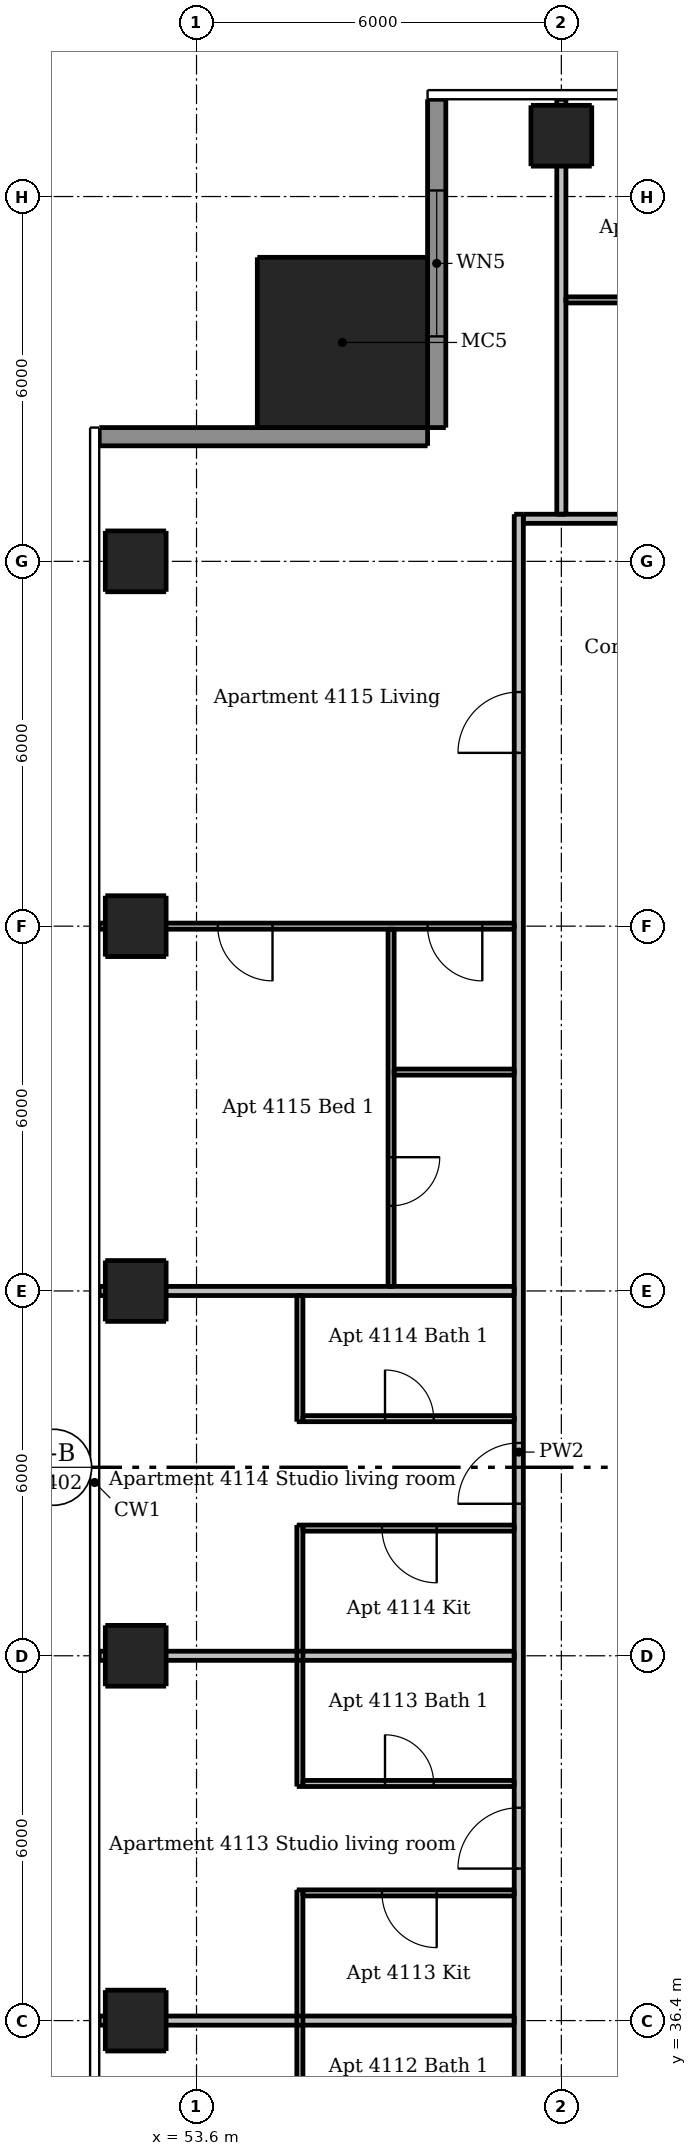
"""IFC4 building model, lengths in metres.
Left out: names, types, materials, properties, quantities, classifications, styles, units other than length and angle.
Written with IfcOpenShell. Run it as: python <this file> out.ifc"""

import sys

from ifc_helpers import new_model, si_unit, direction, frame, frame_2d, origin, origin_2d, place, context, subcontext, project, spatial, rectangle, extrude, element, fill, save


model = new_model("IFC4")
c1 = context("Model", 3, precision=1e-05, world=origin(), true_north=direction((0.0, 1.0)))
c2 = subcontext(c1, "Body", "Model", "MODEL_VIEW")
j1 = project(units=[si_unit("LENGTHUNIT", "METRE"), si_unit("PLANEANGLEUNIT", "RADIAN")], contexts=[c1])
p1 = place(None, origin())
s1 = spatial("IfcSite", under=j1, at=p1, CompositionType="ELEMENT")
p2 = place(p1, origin())
s2 = spatial("IfcBuilding", under=s1, at=p2, CompositionType="ELEMENT")
p3 = place(p2, frame((0.0, 0.0, 154.9)))
s3 = spatial("IfcBuildingStorey", under=s2, at=p3, CompositionType="ELEMENT", Elevation=154.9)
for number, where, z_axis, x_axis in (
    (1, (59.6, 67.4, 0.0), (0.0, 0.0, 1.0), (1.0, 0.0, 0.0)),
    (2, (52.6, 36.4, 0.0), (0.0, 0.0, 1.0), (1.0, 0.0, 0.0)),
    (3, (52.6, 42.4, 0.0), (0.0, 0.0, 1.0), (1.0, 0.0, 0.0)),
    (4, (52.6, 48.4, 0.0), (0.0, 0.0, 1.0), (1.0, 0.0, 0.0)),
    (5, (52.6, 54.4, 0.0), (0.0, 0.0, 1.0), (1.0, 0.0, 0.0)),
    (6, (52.6, 60.4, 0.0), (0.0, 0.0, 1.0), (1.0, 0.0, 0.0)),
):
    element("IfcColumn", number, at=place(p3, frame(where, z_axis=z_axis, x_axis=x_axis)), inside=s3, PredefinedType="COLUMN", context=c2, shape_type="SweptSolid", body=[
        extrude(rectangle(XDim=1.0, YDim=1.0, at=origin_2d()), origin(), (0.0, 0.0, 1.0), 3.05),
    ])
p4 = place(p3, frame((56.0, 64.0, 0.0), z_axis=(0.0, 0.0, 1.0), x_axis=(1.0, 0.0, 0.0)))
e7 = element("IfcColumn", 7, at=p4, inside=s3, PredefinedType="COLUMN", context=c2, shape_type="SweptSolid", body=[
    extrude(rectangle(XDim=2.8, YDim=2.8, at=origin_2d()), origin(), (0.0, 0.0, 1.0), 3.3),
])
p5 = place(p3, frame((57.55, 68.0, 0.0), z_axis=(0.0, 0.0, 1.0), x_axis=(0.0, -1.0, 0.0)))
e8 = element("IfcWall", 8, at=p5, inside=s3, PredefinedType="SOLIDWALL", context=c2, shape_type="SweptSolid", body=[
    extrude(rectangle(XDim=5.4, YDim=0.3, at=frame_2d((2.7, 0.0))), origin(), (0.0, 0.0, 1.0), 3.05),
])
p6 = place(p5, frame((1.5, 0.0, 0.15)))
e9 = element("IfcOpeningElement", 9, at=p6, cuts=e8, PredefinedType="OPENING", context=c2, shape_type="SweptSolid", body=[
    extrude(rectangle(XDim=2.4, YDim=2.1, at=frame_2d((1.2, 1.05))), frame((0.0, 0.16, 0.0), z_axis=(0.0, -1.0, 0.0), x_axis=(1.0, 0.0, 0.0)), (0.0, 0.0, 1.0), 0.32),
])
p7 = place(p3, frame((57.4, 62.45, 0.0), z_axis=(0.0, 0.0, 1.0), x_axis=(-1.0, 0.0, 0.0)))
e10 = element("IfcWall", 10, at=p7, inside=s3, PredefinedType="SOLIDWALL", context=c2, shape_type="SweptSolid", body=[
    extrude(rectangle(XDim=5.4, YDim=0.3, at=frame_2d((2.7, 0.0))), origin(), (0.0, 0.0, 1.0), 3.05),
])
for number, where, z_axis, x_axis in (
    (11, (55.3, 34.25, 0.0), (0.0, 0.0, 1.0), (0.0, 1.0, 0.0)),
    (12, (55.3, 40.25, 0.0), (0.0, 0.0, 1.0), (0.0, 1.0, 0.0)),
):
    element("IfcWall", number, at=place(p3, frame(where, z_axis=z_axis, x_axis=x_axis)), inside=s3, PredefinedType="PARTITIONING", context=c2, shape_type="SweptSolid", body=[
        extrude(rectangle(XDim=4.3, YDim=0.1, at=frame_2d((2.15, 0.0))), origin(), (0.0, 0.0, 1.0), 3.05),
    ])
p8 = place(p3, frame((55.3, 46.25, 0.0), z_axis=(0.0, 0.0, 1.0), x_axis=(0.0, 1.0, 0.0)))
e13 = element("IfcWall", 13, at=p8, inside=s3, PredefinedType="PARTITIONING", context=c2, shape_type="SweptSolid", body=[
    extrude(rectangle(XDim=2.075, YDim=0.1, at=frame_2d((1.038, 0.0))), origin(), (0.0, 0.0, 1.0), 3.05),
])
p9 = place(p3, frame((56.8, 54.35, 0.0), z_axis=(0.0, 0.0, 1.0), x_axis=(0.0, -1.0, 0.0)))
e14 = element("IfcWall", 14, at=p9, inside=s3, PredefinedType="PARTITIONING", context=c2, shape_type="SweptSolid", body=[
    extrude(rectangle(XDim=5.875, YDim=0.1, at=frame_2d((2.938, 0.0))), origin(), (0.0, 0.0, 1.0), 3.05),
])
p10 = place(p9, frame((3.75, 0.0, 0.0)))
e15 = element("IfcOpeningElement", 15, at=p10, cuts=e14, PredefinedType="OPENING", context=c2, shape_type="SweptSolid", body=[
    extrude(rectangle(XDim=0.8, YDim=2.1, at=frame_2d((0.4, 1.05))), frame((0.0, 0.06, 0.0), z_axis=(0.0, -1.0, 0.0), x_axis=(1.0, 0.0, 0.0)), (0.0, 0.0, 1.0), 0.12),
])
p11 = place(p3, frame((59.675, 64.7, 0.0), z_axis=(0.0, 0.0, 1.0), x_axis=(1.0, 0.0, 0.0)))
e16 = element("IfcWall", 16, at=p11, inside=s3, PredefinedType="PARTITIONING", context=c2, shape_type="SweptSolid", body=[
    extrude(rectangle(XDim=1.975, YDim=0.1, at=frame_2d((0.987, 0.0))), origin(), (0.0, 0.0, 1.0), 3.05),
])
p12 = place(p3, frame((58.825, 54.4, 0.0), z_axis=(0.0, 0.0, 1.0), x_axis=(-1.0, 0.0, 0.0)))
e17 = element("IfcWall", 17, at=p12, inside=s3, PredefinedType="PARTITIONING", context=c2, shape_type="SweptSolid", body=[
    extrude(rectangle(XDim=6.825, YDim=0.1, at=frame_2d((3.413, 0.0))), origin(), (0.0, 0.0, 1.0), 2.516),
])
p13 = place(p12, frame((0.525, 0.0, 0.0)))
e18 = element("IfcOpeningElement", 18, at=p13, cuts=e17, PredefinedType="OPENING", context=c2, shape_type="SweptSolid", body=[
    extrude(rectangle(XDim=0.9, YDim=2.1, at=frame_2d((0.45, 1.05))), frame((0.0, 0.06, 0.0), z_axis=(0.0, -1.0, 0.0), x_axis=(1.0, 0.0, 0.0)), (0.0, 0.0, 1.0), 0.12),
])
p14 = place(p12, frame((3.975, 0.0, 0.0)))
e19 = element("IfcOpeningElement", 19, at=p14, cuts=e17, PredefinedType="OPENING", context=c2, shape_type="SweptSolid", body=[
    extrude(rectangle(XDim=0.9, YDim=2.1, at=frame_2d((0.45, 1.05))), frame((0.0, 0.06, 0.0), z_axis=(0.0, -1.0, 0.0), x_axis=(1.0, 0.0, 0.0)), (0.0, 0.0, 1.0), 0.12),
])
p15 = place(p3, frame((56.85, 52.0, 0.0), z_axis=(0.0, 0.0, 1.0), x_axis=(1.0, 0.0, 0.0)))
e20 = element("IfcWall", 20, at=p15, inside=s3, PredefinedType="PARTITIONING", context=c2, shape_type="SweptSolid", body=[
    extrude(rectangle(XDim=1.975, YDim=0.1, at=frame_2d((0.987, 0.0))), origin(), (0.0, 0.0, 1.0), 3.05),
])
p16 = place(p3, frame((55.35, 46.3, 0.0), z_axis=(0.0, 0.0, 1.0), x_axis=(1.0, 0.0, 0.0)))
e21 = element("IfcWall", 21, at=p16, inside=s3, PredefinedType="PARTITIONING", context=c2, shape_type="SweptSolid", body=[
    extrude(rectangle(XDim=3.475, YDim=0.1, at=frame_2d((1.737, 0.0))), origin(), (0.0, 0.0, 1.0), 3.05),
])
p17 = place(p16, frame((1.35, 0.0, 0.0)))
e22 = element("IfcOpeningElement", 22, at=p17, cuts=e21, PredefinedType="OPENING", context=c2, shape_type="SweptSolid", body=[
    extrude(rectangle(XDim=0.8, YDim=2.1, at=frame_2d((0.4, 1.05))), frame((0.0, 0.06, 0.0), z_axis=(0.0, -1.0, 0.0), x_axis=(1.0, 0.0, 0.0)), (0.0, 0.0, 1.0), 0.12),
])
p18 = place(p3, frame((58.825, 44.5, 0.0), z_axis=(0.0, 0.0, 1.0), x_axis=(-1.0, 0.0, 0.0)))
e23 = element("IfcWall", 23, at=p18, inside=s3, PredefinedType="PARTITIONING", context=c2, shape_type="SweptSolid", body=[
    extrude(rectangle(XDim=3.475, YDim=0.1, at=frame_2d((1.737, 0.0))), origin(), (0.0, 0.0, 1.0), 3.05),
])
p19 = place(p18, frame((1.275, 0.0, 0.0)))
e24 = element("IfcOpeningElement", 24, at=p19, cuts=e23, PredefinedType="OPENING", context=c2, shape_type="SweptSolid", body=[
    extrude(rectangle(XDim=0.9, YDim=2.1, at=frame_2d((0.45, 1.05))), frame((0.0, 0.06, 0.0), z_axis=(0.0, -1.0, 0.0), x_axis=(1.0, 0.0, 0.0)), (0.0, 0.0, 1.0), 0.12),
])
p20 = place(p3, frame((55.35, 40.3, 0.0), z_axis=(0.0, 0.0, 1.0), x_axis=(1.0, 0.0, 0.0)))
e25 = element("IfcWall", 25, at=p20, inside=s3, PredefinedType="PARTITIONING", context=c2, shape_type="SweptSolid", body=[
    extrude(rectangle(XDim=3.475, YDim=0.1, at=frame_2d((1.737, 0.0))), origin(), (0.0, 0.0, 1.0), 3.05),
])
p21 = place(p20, frame((1.35, 0.0, 0.0)))
e26 = element("IfcOpeningElement", 26, at=p21, cuts=e25, PredefinedType="OPENING", context=c2, shape_type="SweptSolid", body=[
    extrude(rectangle(XDim=0.8, YDim=2.1, at=frame_2d((0.4, 1.05))), frame((0.0, 0.06, 0.0), z_axis=(0.0, -1.0, 0.0), x_axis=(1.0, 0.0, 0.0)), (0.0, 0.0, 1.0), 0.12),
])
p22 = place(p3, frame((58.825, 38.5, 0.0), z_axis=(0.0, 0.0, 1.0), x_axis=(-1.0, 0.0, 0.0)))
e27 = element("IfcWall", 27, at=p22, inside=s3, PredefinedType="PARTITIONING", context=c2, shape_type="SweptSolid", body=[
    extrude(rectangle(XDim=3.475, YDim=0.1, at=frame_2d((1.737, 0.0))), origin(), (0.0, 0.0, 1.0), 3.05),
])
p23 = place(p22, frame((1.275, 0.0, 0.0)))
e28 = element("IfcOpeningElement", 28, at=p23, cuts=e27, PredefinedType="OPENING", context=c2, shape_type="SweptSolid", body=[
    extrude(rectangle(XDim=0.9, YDim=2.1, at=frame_2d((0.45, 1.05))), frame((0.0, 0.06, 0.0), z_axis=(0.0, -1.0, 0.0), x_axis=(1.0, 0.0, 0.0)), (0.0, 0.0, 1.0), 0.12),
])
p24 = place(p3, frame((58.9, 30.325, 0.0), z_axis=(0.0, 0.0, 1.0), x_axis=(0.0, 1.0, 0.0)))
e29 = element("IfcWall", 29, at=p24, inside=s3, PredefinedType="PARTITIONING", context=c2, shape_type="SweptSolid", body=[
    extrude(rectangle(XDim=30.85, YDim=0.15, at=frame_2d((15.425, 0.0))), origin(), (0.0, 0.0, 1.0), 3.05),
])
p25 = place(p24, frame((2.575, 0.0, 0.0)))
e30 = element("IfcOpeningElement", 30, at=p25, cuts=e29, PredefinedType="OPENING", context=c2, shape_type="SweptSolid", body=[
    extrude(rectangle(XDim=1.0, YDim=2.1, at=frame_2d((0.5, 1.05))), frame((0.0, 0.085, 0.0), z_axis=(0.0, -1.0, 0.0), x_axis=(1.0, 0.0, 0.0)), (0.0, 0.0, 1.0), 0.17),
])
p26 = place(p24, frame((8.575, 0.0, 0.0)))
e31 = element("IfcOpeningElement", 31, at=p26, cuts=e29, PredefinedType="OPENING", context=c2, shape_type="SweptSolid", body=[
    extrude(rectangle(XDim=1.0, YDim=2.1, at=frame_2d((0.5, 1.05))), frame((0.0, 0.085, 0.0), z_axis=(0.0, -1.0, 0.0), x_axis=(1.0, 0.0, 0.0)), (0.0, 0.0, 1.0), 0.17),
])
p27 = place(p24, frame((14.575, 0.0, 0.0)))
e32 = element("IfcOpeningElement", 32, at=p27, cuts=e29, PredefinedType="OPENING", context=c2, shape_type="SweptSolid", body=[
    extrude(rectangle(XDim=1.0, YDim=2.1, at=frame_2d((0.5, 1.05))), frame((0.0, 0.085, 0.0), z_axis=(0.0, -1.0, 0.0), x_axis=(1.0, 0.0, 0.0)), (0.0, 0.0, 1.0), 0.17),
])
p28 = place(p24, frame((26.925, 0.0, 0.0)))
e33 = element("IfcOpeningElement", 33, at=p28, cuts=e29, PredefinedType="OPENING", context=c2, shape_type="SweptSolid", body=[
    extrude(rectangle(XDim=1.0, YDim=2.1, at=frame_2d((0.5, 1.05))), frame((0.0, 0.085, 0.0), z_axis=(0.0, -1.0, 0.0), x_axis=(1.0, 0.0, 0.0)), (0.0, 0.0, 1.0), 0.17),
])
p29 = place(p3, frame((59.6, 61.175, 0.0), z_axis=(0.0, 0.0, 1.0), x_axis=(0.0, 1.0, 0.0)))
e34 = element("IfcWall", 34, at=p29, inside=s3, PredefinedType="PARTITIONING", context=c2, shape_type="SweptSolid", body=[
    extrude(rectangle(XDim=6.825, YDim=0.15, at=frame_2d((3.413, 0.0))), origin(), (0.0, 0.0, 1.0), 2.51),
])
p30 = place(p3, frame((58.975, 61.1, 0.0), z_axis=(0.0, 0.0, 1.0), x_axis=(1.0, 0.0, 0.0)))
e35 = element("IfcWall", 35, at=p30, inside=s3, PredefinedType="PARTITIONING", context=c2, shape_type="SweptSolid", body=[
    extrude(rectangle(XDim=29.25, YDim=0.15, at=frame_2d((14.625, 0.0))), origin(), (0.0, 0.0, 1.0), 3.05),
])
p31 = place(p30, frame((3.125, 0.0, 0.0)))
e36 = element("IfcOpeningElement", 36, at=p31, cuts=e35, PredefinedType="OPENING", context=c2, shape_type="SweptSolid", body=[
    extrude(rectangle(XDim=1.0, YDim=2.1, at=frame_2d((0.5, 1.05))), frame((0.0, 0.085, 0.0), z_axis=(0.0, -1.0, 0.0), x_axis=(1.0, 0.0, 0.0)), (0.0, 0.0, 1.0), 0.17),
])
p32 = place(p30, frame((9.125, 0.0, 0.0)))
e37 = element("IfcOpeningElement", 37, at=p32, cuts=e35, PredefinedType="OPENING", context=c2, shape_type="SweptSolid", body=[
    extrude(rectangle(XDim=1.0, YDim=2.1, at=frame_2d((0.5, 1.05))), frame((0.0, 0.085, 0.0), z_axis=(0.0, -1.0, 0.0), x_axis=(1.0, 0.0, 0.0)), (0.0, 0.0, 1.0), 0.17),
])
p33 = place(p30, frame((15.125, 0.0, 0.0)))
e38 = element("IfcOpeningElement", 38, at=p33, cuts=e35, PredefinedType="OPENING", context=c2, shape_type="SweptSolid", body=[
    extrude(rectangle(XDim=1.0, YDim=2.1, at=frame_2d((0.5, 1.05))), frame((0.0, 0.085, 0.0), z_axis=(0.0, -1.0, 0.0), x_axis=(1.0, 0.0, 0.0)), (0.0, 0.0, 1.0), 0.17),
])
p34 = place(p30, frame((26.475, 0.0, 0.0)))
e39 = element("IfcOpeningElement", 39, at=p34, cuts=e35, PredefinedType="OPENING", context=c2, shape_type="SweptSolid", body=[
    extrude(rectangle(XDim=1.0, YDim=2.1, at=frame_2d((0.5, 1.05))), frame((0.0, 0.085, 0.0), z_axis=(0.0, -1.0, 0.0), x_axis=(1.0, 0.0, 0.0)), (0.0, 0.0, 1.0), 0.17),
])
for number, where, z_axis, x_axis in (
    (40, (52.0, 48.4, 0.0), (0.0, 0.0, 1.0), (1.0, 0.0, 0.0)),
    (41, (52.0, 42.4, 0.0), (0.0, 0.0, 1.0), (1.0, 0.0, 0.0)),
    (42, (52.0, 36.4, 0.0), (0.0, 0.0, 1.0), (1.0, 0.0, 0.0)),
):
    element("IfcWall", number, at=place(p3, frame(where, z_axis=z_axis, x_axis=x_axis)), inside=s3, PredefinedType="PARTITIONING", context=c2, shape_type="SweptSolid", body=[
        extrude(rectangle(XDim=6.825, YDim=0.15, at=frame_2d((3.413, 0.0))), origin(), (0.0, 0.0, 1.0), 2.516),
    ])
p35 = place(p6, origin())
e43 = element("IfcWindow", 43, at=p35, inside=s3, PartitioningType="DOUBLE_PANEL_VERTICAL", PredefinedType="WINDOW", context=c2, shape_type="SweptSolid", body=[
    extrude(rectangle(XDim=2.4, YDim=2.1, at=frame_2d((1.2, 1.05))), frame((0.0, 0.03, 0.0), z_axis=(0.0, -1.0, 0.0), x_axis=(1.0, 0.0, 0.0)), (0.0, 0.0, 1.0), 0.06),
])
fill(e9, e43)
p36 = place(p26, origin())
e44 = element("IfcDoor", 44, at=p36, inside=s3, OperationType="SINGLE_SWING_LEFT", PredefinedType="DOOR", context=c2, shape_type="SweptSolid", body=[
    extrude(rectangle(XDim=1.0, YDim=2.1, at=frame_2d((0.5, 1.05))), frame((0.0, 0.025, 0.0), z_axis=(0.0, -1.0, 0.0), x_axis=(1.0, 0.0, 0.0)), (0.0, 0.0, 1.0), 0.05),
])
fill(e31, e44)
p37 = place(p23, origin())
e45 = element("IfcDoor", 45, at=p37, inside=s3, OperationType="SINGLE_SWING_LEFT", PredefinedType="DOOR", context=c2, shape_type="SweptSolid", body=[
    extrude(rectangle(XDim=0.9, YDim=2.1, at=frame_2d((0.45, 1.05))), frame((0.0, 0.025, 0.0), z_axis=(0.0, -1.0, 0.0), x_axis=(1.0, 0.0, 0.0)), (0.0, 0.0, 1.0), 0.05),
])
fill(e28, e45)
p38 = place(p21, origin())
e46 = element("IfcDoor", 46, at=p38, inside=s3, OperationType="SINGLE_SWING_LEFT", PredefinedType="DOOR", context=c2, shape_type="SweptSolid", body=[
    extrude(rectangle(XDim=0.8, YDim=2.1, at=frame_2d((0.4, 1.05))), frame((0.0, 0.025, 0.0), z_axis=(0.0, -1.0, 0.0), x_axis=(1.0, 0.0, 0.0)), (0.0, 0.0, 1.0), 0.05),
])
fill(e26, e46)
p39 = place(p27, origin())
e47 = element("IfcDoor", 47, at=p39, inside=s3, OperationType="SINGLE_SWING_LEFT", PredefinedType="DOOR", context=c2, shape_type="SweptSolid", body=[
    extrude(rectangle(XDim=1.0, YDim=2.1, at=frame_2d((0.5, 1.05))), frame((0.0, 0.025, 0.0), z_axis=(0.0, -1.0, 0.0), x_axis=(1.0, 0.0, 0.0)), (0.0, 0.0, 1.0), 0.05),
])
fill(e32, e47)
p40 = place(p19, origin())
e48 = element("IfcDoor", 48, at=p40, inside=s3, OperationType="SINGLE_SWING_LEFT", PredefinedType="DOOR", context=c2, shape_type="SweptSolid", body=[
    extrude(rectangle(XDim=0.9, YDim=2.1, at=frame_2d((0.45, 1.05))), frame((0.0, 0.025, 0.0), z_axis=(0.0, -1.0, 0.0), x_axis=(1.0, 0.0, 0.0)), (0.0, 0.0, 1.0), 0.05),
])
fill(e24, e48)
p41 = place(p17, origin())
e49 = element("IfcDoor", 49, at=p41, inside=s3, OperationType="SINGLE_SWING_LEFT", PredefinedType="DOOR", context=c2, shape_type="SweptSolid", body=[
    extrude(rectangle(XDim=0.8, YDim=2.1, at=frame_2d((0.4, 1.05))), frame((0.0, 0.025, 0.0), z_axis=(0.0, -1.0, 0.0), x_axis=(1.0, 0.0, 0.0)), (0.0, 0.0, 1.0), 0.05),
])
fill(e22, e49)
p42 = place(p28, origin())
e50 = element("IfcDoor", 50, at=p42, inside=s3, OperationType="SINGLE_SWING_LEFT", PredefinedType="DOOR", context=c2, shape_type="SweptSolid", body=[
    extrude(rectangle(XDim=1.0, YDim=2.1, at=frame_2d((0.5, 1.05))), frame((0.0, 0.025, 0.0), z_axis=(0.0, -1.0, 0.0), x_axis=(1.0, 0.0, 0.0)), (0.0, 0.0, 1.0), 0.05),
])
fill(e33, e50)
p43 = place(p13, origin())
e51 = element("IfcDoor", 51, at=p43, inside=s3, OperationType="SINGLE_SWING_LEFT", PredefinedType="DOOR", context=c2, shape_type="SweptSolid", body=[
    extrude(rectangle(XDim=0.9, YDim=2.1, at=frame_2d((0.45, 1.05))), frame((0.0, 0.025, 0.0), z_axis=(0.0, -1.0, 0.0), x_axis=(1.0, 0.0, 0.0)), (0.0, 0.0, 1.0), 0.05),
])
fill(e18, e51)
p44 = place(p14, origin())
e52 = element("IfcDoor", 52, at=p44, inside=s3, OperationType="SINGLE_SWING_LEFT", PredefinedType="DOOR", context=c2, shape_type="SweptSolid", body=[
    extrude(rectangle(XDim=0.9, YDim=2.1, at=frame_2d((0.45, 1.05))), frame((0.0, 0.025, 0.0), z_axis=(0.0, -1.0, 0.0), x_axis=(1.0, 0.0, 0.0)), (0.0, 0.0, 1.0), 0.05),
])
fill(e19, e52)
p45 = place(p10, origin())
e53 = element("IfcDoor", 53, at=p45, inside=s3, OperationType="SINGLE_SWING_LEFT", PredefinedType="DOOR", context=c2, shape_type="SweptSolid", body=[
    extrude(rectangle(XDim=0.8, YDim=2.1, at=frame_2d((0.4, 1.05))), frame((0.0, 0.025, 0.0), z_axis=(0.0, -1.0, 0.0), x_axis=(1.0, 0.0, 0.0)), (0.0, 0.0, 1.0), 0.05),
])
fill(e15, e53)
save(model, sys.argv[1])
